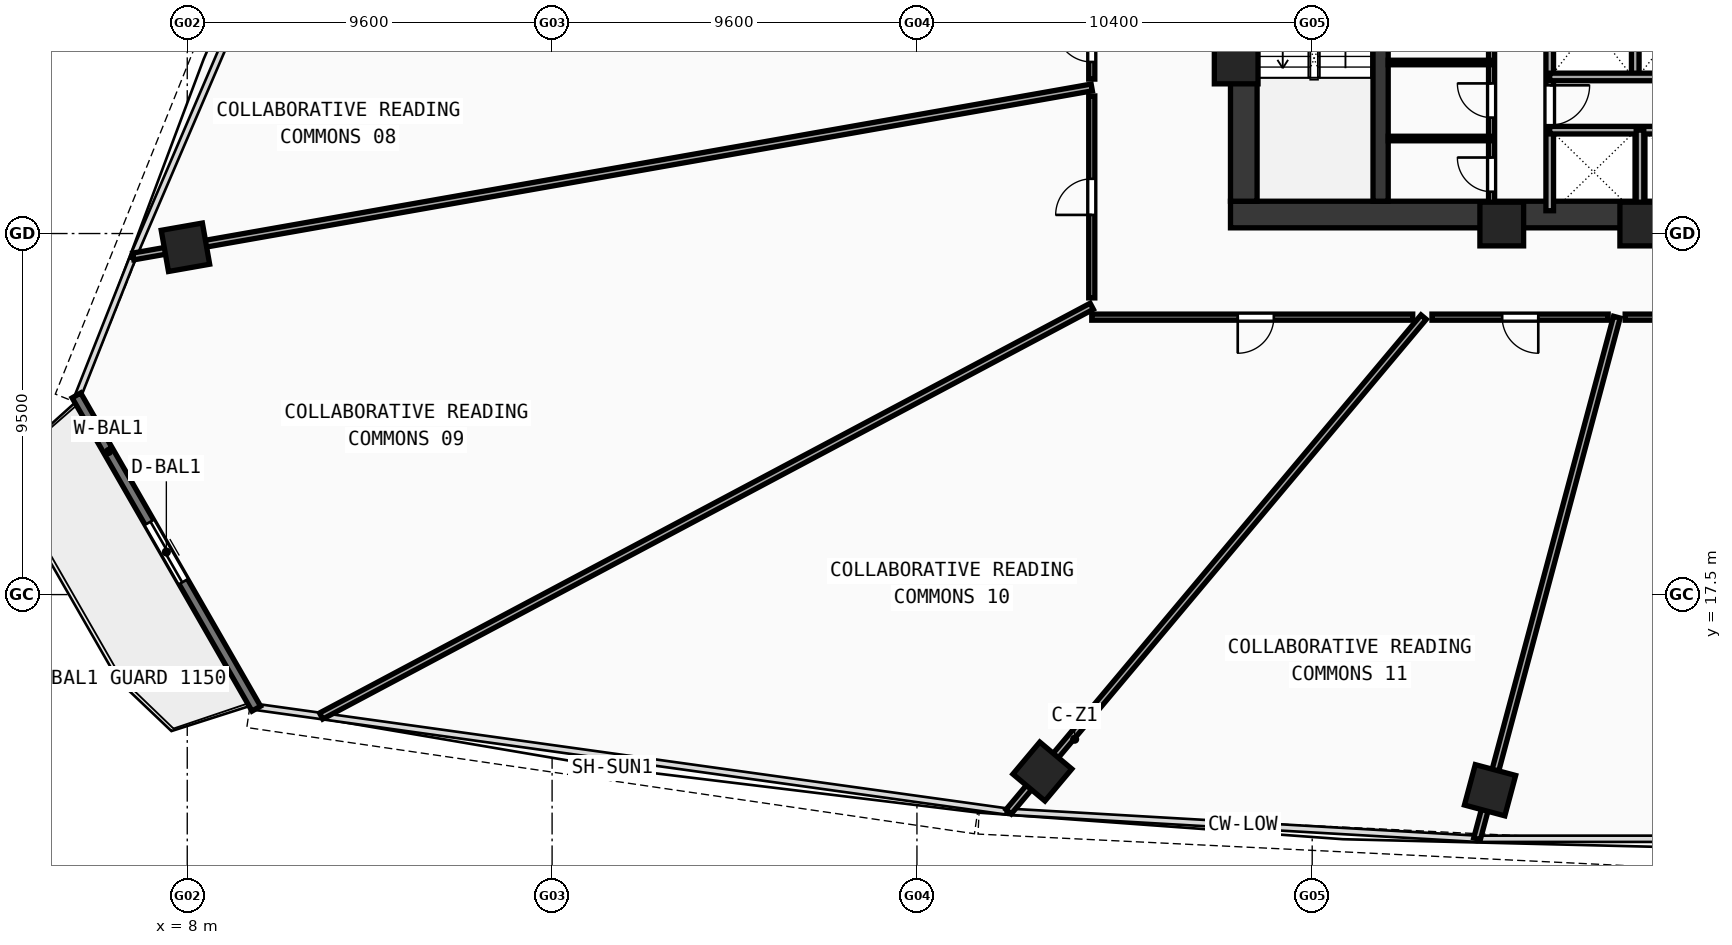
"""IFC4 building model, lengths in metres.
Left out: names, types, materials, properties, quantities, classifications, styles, units other than length and angle.
Written with IfcOpenShell. Run it as: python <this file> out.ifc"""

import sys

from ifc_helpers import new_model, si_unit, direction, frame, frame_2d, origin, origin_with_axes, origin_2d, place, context, subcontext, project, spatial, rectangle, hollow_rectangle, extrude, source, transform, mapped, element, fill, save


model = new_model("IFC4")
c1 = context("Model", 3, precision=1e-05, world=origin(), true_north=direction((0.0, 1.0)))
c2 = subcontext(c1, "Body", "Model", "MODEL_VIEW")
j1 = project(units=[si_unit("LENGTHUNIT", "METRE"), si_unit("PLANEANGLEUNIT", "RADIAN")], contexts=[c1])
p1 = place(None, origin())
s1 = spatial("IfcSite", under=j1, at=p1, CompositionType="ELEMENT")
p2 = place(p1, origin())
s2 = spatial("IfcBuilding", under=s1, at=p2, CompositionType="ELEMENT")
p3 = place(p2, frame((0.0, 0.0, 59.44)))
s3 = spatial("IfcBuildingStorey", under=s2, at=p3, CompositionType="ELEMENT", Elevation=59.44)
p4 = place(p3, frame((35.45, 27.5, 0.0), z_axis=(0.0, 0.0, 1.0), x_axis=(1.0, 0.0, 0.0)))
e1 = element("IfcWall", 1, at=p4, inside=s3, PredefinedType="SHEAR", context=c2, shape_type="SweptSolid", body=[
    extrude(rectangle(XDim=25.1, YDim=0.7, at=frame_2d((12.55, 0.0))), origin(), (0.0, 0.0, 1.0), 3.37),
])
p5 = place(p3, frame((35.8, 27.85, 0.0), z_axis=(0.0, 0.0, 1.0), x_axis=(0.0, 1.0, 0.0)))
e2 = element("IfcWall", 2, at=p5, inside=s3, PredefinedType="SHEAR", context=c2, shape_type="SweptSolid", body=[
    extrude(rectangle(XDim=12.0, YDim=0.7, at=frame_2d((6.0, 0.0))), origin(), (0.0, 0.0, 1.0), 3.37),
])
p6 = place(p3, frame((39.4, 27.85, 0.0), z_axis=(0.0, 0.0, 1.0), x_axis=(0.0, 1.0, 0.0)))
e3 = element("IfcWall", 3, at=p6, inside=s3, PredefinedType="SHEAR", context=c2, shape_type="SweptSolid", body=[
    extrude(rectangle(XDim=12.0, YDim=0.4, at=frame_2d((6.0, 0.0))), origin(), (0.0, 0.0, 1.0), 3.37),
])
p7 = place(p6, frame((9.9, 0.0, 0.0)))
e4 = element("IfcOpeningElement", 4, at=p7, cuts=e3, PredefinedType="OPENING", context=c2, shape_type="SweptSolid", body=[
    extrude(rectangle(XDim=1.1, YDim=2.1, at=frame_2d((0.55, 1.05))), frame((0.0, 0.21, 0.0), z_axis=(0.0, -1.0, 0.0), x_axis=(1.0, 0.0, 0.0)), (0.0, 0.0, 1.0), 0.42),
])
m1 = source(origin(), c2, "Body", "SweptSolid", [
    extrude(hollow_rectangle(XDim=1.15, YDim=1.15, WallThickness=0.048, at=origin_2d()), origin(), (0.0, 0.0, 1.0), 3.63),
])
for number, where, z_axis, x_axis in (
    (5, (42.588, 27.25, -0.26), (0.0, 0.0, 1.0), (1.0, 0.0, 0.0)),
    (6, (46.272, 27.25, -0.26), (0.0, 0.0, 1.0), (1.0, 0.0, 0.0)),
    (7, (35.6, 31.513, -0.26), (0.0, 0.0, 1.0), (1.0, 0.0, 0.0)),
):
    element("IfcColumn", number, at=place(p3, frame(where, z_axis=z_axis, x_axis=x_axis)), inside=s3, PredefinedType="COLUMN", context=c2, shape_type="MappedRepresentation", body=[
        mapped(m1, transform((0.0, 0.0, 0.0), scale=1.0)),
    ])
m2 = source(origin(), c2, "Body", "SweptSolid", [
    extrude(hollow_rectangle(XDim=1.1, YDim=1.1, WallThickness=0.045, at=origin_2d()), origin(), (0.0, 0.0, 1.0), 3.63),
])
for number, where, z_axis, x_axis in (
    (8, (30.5, 12.844, -0.26), (0.0, 0.0, 1.0), (0.766, -0.643, 0.0)),
    (9, (42.28, 12.352, -0.26), (0.0, 0.0, 1.0), (0.966, -0.259, 0.0)),
    (10, (7.952, 26.638, -0.26), (0.0, 0.0, 1.0), (0.174, -0.985, 0.0)),
):
    element("IfcColumn", number, at=place(p3, frame(where, z_axis=z_axis, x_axis=x_axis)), inside=s3, PredefinedType="COLUMN", context=c2, shape_type="MappedRepresentation", body=[
        mapped(m2, transform((0.0, 0.0, 0.0), scale=1.0)),
    ])
p8 = place(p3, frame((5.084, 22.741, 0.0), z_axis=(0.0, 0.0, 1.0), x_axis=(0.497919395469, -0.86722331358, 0.0)))
e11 = element("IfcWall", 11, at=p8, inside=s3, PredefinedType="STANDARD", context=c2, shape_type="SweptSolid", body=[
    extrude(rectangle(XDim=9.504, YDim=0.26, at=frame_2d((4.752, 0.0))), origin(), (0.0, 0.0, 1.0), 3.37),
])
p9 = place(p8, frame((3.852, 0.0, 0.0)))
e12 = element("IfcOpeningElement", 12, at=p9, cuts=e11, PredefinedType="OPENING", context=c2, shape_type="SweptSolid", body=[
    extrude(rectangle(XDim=1.8, YDim=2.15, at=frame_2d((0.9, 1.075))), frame((0.0, 0.14, 0.0), z_axis=(0.0, -1.0, 0.0), x_axis=(1.0, 0.0, 0.0)), (0.0, 0.0, 1.0), 0.28),
])
p10 = place(p3, frame((43.85, 27.6, 0.0), z_axis=(0.0, 0.0, 1.0), x_axis=(0.0, 1.0, 0.0)))
e13 = element("IfcWall", 13, at=p10, inside=s3, PredefinedType="SOLIDWALL", context=c2, shape_type="SweptSolid", body=[
    extrude(rectangle(XDim=6.22, YDim=0.2, at=frame_2d((3.11, 0.0))), origin(), (0.0, 0.0, 1.0), 3.37),
])
p11 = place(p10, frame((2.25, 0.0, 0.0)))
e14 = element("IfcOpeningElement", 14, at=p11, cuts=e13, PredefinedType="OPENING", context=c2, shape_type="SweptSolid", body=[
    extrude(rectangle(XDim=1.05, YDim=2.1, at=frame_2d((0.525, 1.05))), frame((0.0, 0.11, 0.0), z_axis=(0.0, -1.0, 0.0), x_axis=(1.0, 0.0, 0.0)), (0.0, 0.0, 1.0), 0.22),
])
p12 = place(p3, frame((46.1, 31.12, 0.0), z_axis=(0.0, 0.0, 1.0), x_axis=(0.0, 1.0, 0.0)))
e15 = element("IfcWall", 15, at=p12, inside=s3, PredefinedType="SOLIDWALL", context=c2, shape_type="SweptSolid", body=[
    extrude(rectangle(XDim=2.7, YDim=0.2, at=frame_2d((1.35, 0.0))), origin(), (0.0, 0.0, 1.0), 3.37),
])
p13 = place(p3, frame((43.85, 29.72, 0.0), z_axis=(0.0, 0.0, 1.0), x_axis=(1.0, 0.0, 0.0)))
e16 = element("IfcWall", 16, at=p13, inside=s3, PredefinedType="SOLIDWALL", context=c2, shape_type="SweptSolid", body=[
    extrude(rectangle(XDim=7.2, YDim=0.2, at=frame_2d((3.6, 0.0))), origin(), (0.0, 0.0, 1.0), 3.37),
])
p14 = place(p3, frame((43.85, 31.12, 0.0), z_axis=(0.0, 0.0, 1.0), x_axis=(1.0, 0.0, 0.0)))
e17 = element("IfcWall", 17, at=p14, inside=s3, PredefinedType="SOLIDWALL", context=c2, shape_type="SweptSolid", body=[
    extrude(rectangle(XDim=9.83, YDim=0.2, at=frame_2d((4.915, 0.0))), origin(), (0.0, 0.0, 1.0), 3.37),
])
p15 = place(p3, frame((46.225, 27.6, 0.0), z_axis=(0.0, 0.0, 1.0), x_axis=(0.0, 1.0, 0.0)))
e18 = element("IfcWall", 18, at=p15, inside=s3, PredefinedType="SOLIDWALL", context=c2, shape_type="SweptSolid", body=[
    extrude(rectangle(XDim=2.12, YDim=0.2, at=frame_2d((1.06, 0.0))), origin(), (0.0, 0.0, 1.0), 3.37),
])
p16 = place(p3, frame((42.32, 27.6, 0.0), z_axis=(0.0, 0.0, 1.0), x_axis=(0.0, 1.0, 0.0)))
e19 = element("IfcWall", 19, at=p16, inside=s3, PredefinedType="PARTITIONING", context=c2, shape_type="SweptSolid", body=[
    extrude(rectangle(XDim=5.9, YDim=0.16, at=frame_2d((2.95, 0.0))), origin(), (0.0, 0.0, 1.0), 3.37),
])
p17 = place(p16, frame((0.5, 0.0, 0.0)))
e20 = element("IfcOpeningElement", 20, at=p17, cuts=e19, PredefinedType="OPENING", context=c2, shape_type="SweptSolid", body=[
    extrude(rectangle(XDim=0.9, YDim=2.1, at=frame_2d((0.45, 1.05))), frame((0.0, 0.09, 0.0), z_axis=(0.0, -1.0, 0.0), x_axis=(1.0, 0.0, 0.0)), (0.0, 0.0, 1.0), 0.18),
])
p18 = place(p16, frame((2.45, 0.0, 0.0)))
e21 = element("IfcOpeningElement", 21, at=p18, cuts=e19, PredefinedType="OPENING", context=c2, shape_type="SweptSolid", body=[
    extrude(rectangle(XDim=0.9, YDim=2.1, at=frame_2d((0.45, 1.05))), frame((0.0, 0.09, 0.0), z_axis=(0.0, -1.0, 0.0), x_axis=(1.0, 0.0, 0.0)), (0.0, 0.0, 1.0), 0.18),
])
p19 = place(p16, frame((4.42, 0.0, 0.0)))
e22 = element("IfcOpeningElement", 22, at=p19, cuts=e19, PredefinedType="OPENING", context=c2, shape_type="SweptSolid", body=[
    extrude(rectangle(XDim=0.94, YDim=2.1, at=frame_2d((0.47, 1.05))), frame((0.0, 0.09, 0.0), z_axis=(0.0, -1.0, 0.0), x_axis=(1.0, 0.0, 0.0)), (0.0, 0.0, 1.0), 0.18),
])
for number, where, z_axis, x_axis in (
    (23, (39.6, 29.5, 0.0), (0.0, 0.0, 1.0), (1.0, 0.0, 0.0)),
    (24, (39.6, 31.5, 0.0), (0.0, 0.0, 1.0), (1.0, 0.0, 0.0)),
):
    element("IfcWall", number, at=place(p3, frame(where, z_axis=z_axis, x_axis=x_axis)), inside=s3, PredefinedType="PARTITIONING", context=c2, shape_type="SweptSolid", body=[
        extrude(rectangle(XDim=2.72, YDim=0.12, at=frame_2d((1.36, 0.0))), origin(), (0.0, 0.0, 1.0), 3.37),
    ])
p20 = place(p3, frame((31.8, 30.844, 0.0), z_axis=(0.0, 0.0, 1.0), x_axis=(-0.984808213418, -0.173645566555, 0.0)))
e25 = element("IfcWall", 25, at=p20, inside=s3, PredefinedType="PARTITIONING", context=c2, shape_type="SweptSolid", body=[
    extrude(rectangle(XDim=25.61, YDim=0.18, at=frame_2d((12.805, 0.0))), origin(), (0.0, 0.0, 1.0), 2.67),
])
p21 = place(p3, frame((31.8, 25.086, 0.0), z_axis=(0.0, 0.0, 1.0), x_axis=(-0.882952279159, -0.469462749032, 0.0)))
e26 = element("IfcWall", 26, at=p21, inside=s3, PredefinedType="PARTITIONING", context=c2, shape_type="SweptSolid", body=[
    extrude(rectangle(XDim=22.965, YDim=0.18, at=frame_2d((11.482, 0.0))), origin(), (0.0, 0.0, 1.0), 2.67),
])
p22 = place(p3, frame((40.532, 24.8, 0.0), z_axis=(0.0, 0.0, 1.0), x_axis=(-0.642791593325, -0.766041100432, 0.0)))
e27 = element("IfcWall", 27, at=p22, inside=s3, PredefinedType="PARTITIONING", context=c2, shape_type="SweptSolid", body=[
    extrude(rectangle(XDim=16.988, YDim=0.18, at=frame_2d((8.494, 0.0))), origin(), (0.0, 0.0, 1.0), 2.67),
])
p23 = place(p3, frame((45.615, 24.8, 0.0), z_axis=(0.0, 0.0, 1.0), x_axis=(-0.258821679731, -0.965925120339, 0.0)))
e28 = element("IfcWall", 28, at=p23, inside=s3, PredefinedType="PARTITIONING", context=c2, shape_type="SweptSolid", body=[
    extrude(rectangle(XDim=14.209, YDim=0.18, at=frame_2d((7.105, 0.0))), origin(), (0.0, 0.0, 1.0), 2.67),
])
p24 = place(p3, frame((31.8, 25.306, 0.0), z_axis=(0.0, 0.0, 1.0), x_axis=(0.0, 1.0, 0.0)))
e29 = element("IfcWall", 29, at=p24, inside=s3, PredefinedType="PARTITIONING", context=c2, shape_type="SweptSolid", body=[
    extrude(rectangle(XDim=5.314, YDim=0.16, at=frame_2d((2.657, 0.0))), origin(), (0.0, 0.0, 1.0), 2.97),
])
p25 = place(p24, frame((2.184, 0.0, 0.0)))
e30 = element("IfcOpeningElement", 30, at=p25, cuts=e29, PredefinedType="OPENING", context=c2, shape_type="SweptSolid", body=[
    extrude(rectangle(XDim=0.95, YDim=2.1, at=frame_2d((0.475, 1.05))), frame((0.0, 0.09, 0.0), z_axis=(0.0, -1.0, 0.0), x_axis=(1.0, 0.0, 0.0)), (0.0, 0.0, 1.0), 0.18),
])
p26 = place(p3, frame((31.8, 31.063, 0.0), z_axis=(0.0, 0.0, 1.0), x_axis=(0.0, 1.0, 0.0)))
e31 = element("IfcWall", 31, at=p26, inside=s3, PredefinedType="PARTITIONING", context=c2, shape_type="SweptSolid", body=[
    extrude(rectangle(XDim=1.851, YDim=0.16, at=frame_2d((0.926, 0.0))), origin(), (0.0, 0.0, 1.0), 3.37),
])
p27 = place(p26, frame((0.451, 0.0, 0.0)))
e32 = element("IfcOpeningElement", 32, at=p27, cuts=e31, PredefinedType="OPENING", context=c2, shape_type="SweptSolid", body=[
    extrude(rectangle(XDim=0.95, YDim=2.1, at=frame_2d((0.475, 1.05))), frame((0.0, 0.09, 0.0), z_axis=(0.0, -1.0, 0.0), x_axis=(1.0, 0.0, 0.0)), (0.0, 0.0, 1.0), 0.18),
])
p28 = place(p3, frame((55.248, 24.8, 0.0), z_axis=(0.0, 0.0, 1.0), x_axis=(-1.0, 0.0, 0.0)))
e33 = element("IfcWall", 33, at=p28, inside=s3, PredefinedType="PARTITIONING", context=c2, shape_type="SweptSolid", body=[
    extrude(rectangle(XDim=9.413, YDim=0.16, at=frame_2d((4.707, 0.0))), origin(), (0.0, 0.0, 1.0), 2.67),
])
p29 = place(p28, frame((4.231, 0.0, 0.0)))
e34 = element("IfcOpeningElement", 34, at=p29, cuts=e33, PredefinedType="OPENING", context=c2, shape_type="SweptSolid", body=[
    extrude(rectangle(XDim=0.95, YDim=2.1, at=frame_2d((0.475, 1.05))), frame((0.0, 0.09, 0.0), z_axis=(0.0, -1.0, 0.0), x_axis=(1.0, 0.0, 0.0)), (0.0, 0.0, 1.0), 0.18),
])
p30 = place(p3, frame((45.387, 24.8, 0.0), z_axis=(0.0, 0.0, 1.0), x_axis=(-1.0, 0.0, 0.0)))
e35 = element("IfcWall", 35, at=p30, inside=s3, PredefinedType="PARTITIONING", context=c2, shape_type="SweptSolid", body=[
    extrude(rectangle(XDim=4.635, YDim=0.16, at=frame_2d((2.318, 0.0))), origin(), (0.0, 0.0, 1.0), 2.67),
])
p31 = place(p30, frame((1.839, 0.0, 0.0)))
e36 = element("IfcOpeningElement", 36, at=p31, cuts=e35, PredefinedType="OPENING", context=c2, shape_type="SweptSolid", body=[
    extrude(rectangle(XDim=0.95, YDim=2.1, at=frame_2d((0.475, 1.05))), frame((0.0, 0.09, 0.0), z_axis=(0.0, -1.0, 0.0), x_axis=(1.0, 0.0, 0.0)), (0.0, 0.0, 1.0), 0.18),
])
p32 = place(p3, frame((40.245, 24.8, 0.0), z_axis=(0.0, 0.0, 1.0), x_axis=(-1.0, 0.0, 0.0)))
e37 = element("IfcWall", 37, at=p32, inside=s3, PredefinedType="PARTITIONING", context=c2, shape_type="SweptSolid", body=[
    extrude(rectangle(XDim=8.445, YDim=0.16, at=frame_2d((4.222, 0.0))), origin(), (0.0, 0.0, 1.0), 2.97),
])
p33 = place(p32, frame((3.654, 0.0, 0.0)))
e38 = element("IfcOpeningElement", 38, at=p33, cuts=e37, PredefinedType="OPENING", context=c2, shape_type="SweptSolid", body=[
    extrude(rectangle(XDim=0.95, YDim=2.1, at=frame_2d((0.475, 1.05))), frame((0.0, 0.09, 0.0), z_axis=(0.0, -1.0, 0.0), x_axis=(1.0, 0.0, 0.0)), (0.0, 0.0, 1.0), 0.18),
])
m3 = source(origin(), c2, "Body", "SweptSolid", [
    extrude(rectangle(XDim=1.8, YDim=2.15, at=frame_2d((0.9, 1.075))), frame((0.0, 0.025, 0.0), z_axis=(0.0, -1.0, 0.0), x_axis=(1.0, 0.0, 0.0)), (0.0, 0.0, 1.0), 0.05),
])
p34 = place(p9, origin_with_axes())
e39 = element("IfcDoor", 39, at=p34, inside=s3, OperationType="DOUBLE_DOOR_SLIDING", PredefinedType="DOOR", context=c2, shape_type="MappedRepresentation", body=[
    mapped(m3, transform((0.0, 0.0, 0.0), scale=1.0)),
])
fill(e12, e39)
m4 = source(origin(), c2, "Body", "SweptSolid", [
    extrude(rectangle(XDim=1.05, YDim=2.1, at=frame_2d((0.525, 1.05))), frame((0.0, 0.025, 0.0), z_axis=(0.0, -1.0, 0.0), x_axis=(1.0, 0.0, 0.0)), (0.0, 0.0, 1.0), 0.05),
])
p35 = place(p11, frame((1.05, 0.0, 0.0), z_axis=(0.0, 0.0, 1.0), x_axis=(-1.0, 0.0, 0.0)))
e40 = element("IfcDoor", 40, at=p35, inside=s3, OperationType="SINGLE_SWING_LEFT", PredefinedType="DOOR", context=c2, shape_type="MappedRepresentation", body=[
    mapped(m4, transform((0.0, 0.0, 0.0), scale=1.0)),
])
fill(e14, e40)
m5 = source(origin(), c2, "Body", "SweptSolid", [
    extrude(rectangle(XDim=0.9, YDim=2.1, at=frame_2d((0.45, 1.05))), frame((0.0, 0.025, 0.0), z_axis=(0.0, -1.0, 0.0), x_axis=(1.0, 0.0, 0.0)), (0.0, 0.0, 1.0), 0.05),
])
p36 = place(p17, origin_with_axes())
e41 = element("IfcDoor", 41, at=p36, inside=s3, OperationType="SINGLE_SWING_RIGHT", PredefinedType="DOOR", context=c2, shape_type="MappedRepresentation", body=[
    mapped(m5, transform((0.0, 0.0, 0.0), scale=1.0)),
])
fill(e20, e41)
p37 = place(p18, origin_with_axes())
e42 = element("IfcDoor", 42, at=p37, inside=s3, OperationType="SINGLE_SWING_RIGHT", PredefinedType="DOOR", context=c2, shape_type="MappedRepresentation", body=[
    mapped(m5, transform((0.0, 0.0, 0.0), scale=1.0)),
])
fill(e21, e42)
m6 = source(origin(), c2, "Body", "SweptSolid", [
    extrude(rectangle(XDim=0.95, YDim=2.1, at=frame_2d((0.475, 1.05))), frame((0.0, 0.025, 0.0), z_axis=(0.0, -1.0, 0.0), x_axis=(1.0, 0.0, 0.0)), (0.0, 0.0, 1.0), 0.05),
])
p38 = place(p27, origin_with_axes())
e43 = element("IfcDoor", 43, at=p38, inside=s3, OperationType="SINGLE_SWING_RIGHT", PredefinedType="DOOR", context=c2, shape_type="MappedRepresentation", body=[
    mapped(m6, transform((0.0, 0.0, 0.0), scale=1.0)),
])
fill(e32, e43)
p39 = place(p25, origin_with_axes())
e44 = element("IfcDoor", 44, at=p39, inside=s3, OperationType="SINGLE_SWING_LEFT", PredefinedType="DOOR", context=c2, shape_type="MappedRepresentation", body=[
    mapped(m6, transform((0.0, 0.0, 0.0), scale=1.0)),
])
fill(e30, e44)
p40 = place(p33, origin_with_axes())
e45 = element("IfcDoor", 45, at=p40, inside=s3, OperationType="SINGLE_SWING_RIGHT", PredefinedType="DOOR", context=c2, shape_type="MappedRepresentation", body=[
    mapped(m6, transform((0.0, 0.0, 0.0), scale=1.0)),
])
fill(e38, e45)
p41 = place(p31, origin_with_axes())
e46 = element("IfcDoor", 46, at=p41, inside=s3, OperationType="SINGLE_SWING_LEFT", PredefinedType="DOOR", context=c2, shape_type="MappedRepresentation", body=[
    mapped(m6, transform((0.0, 0.0, 0.0), scale=1.0)),
])
fill(e36, e46)
save(model, sys.argv[1])
